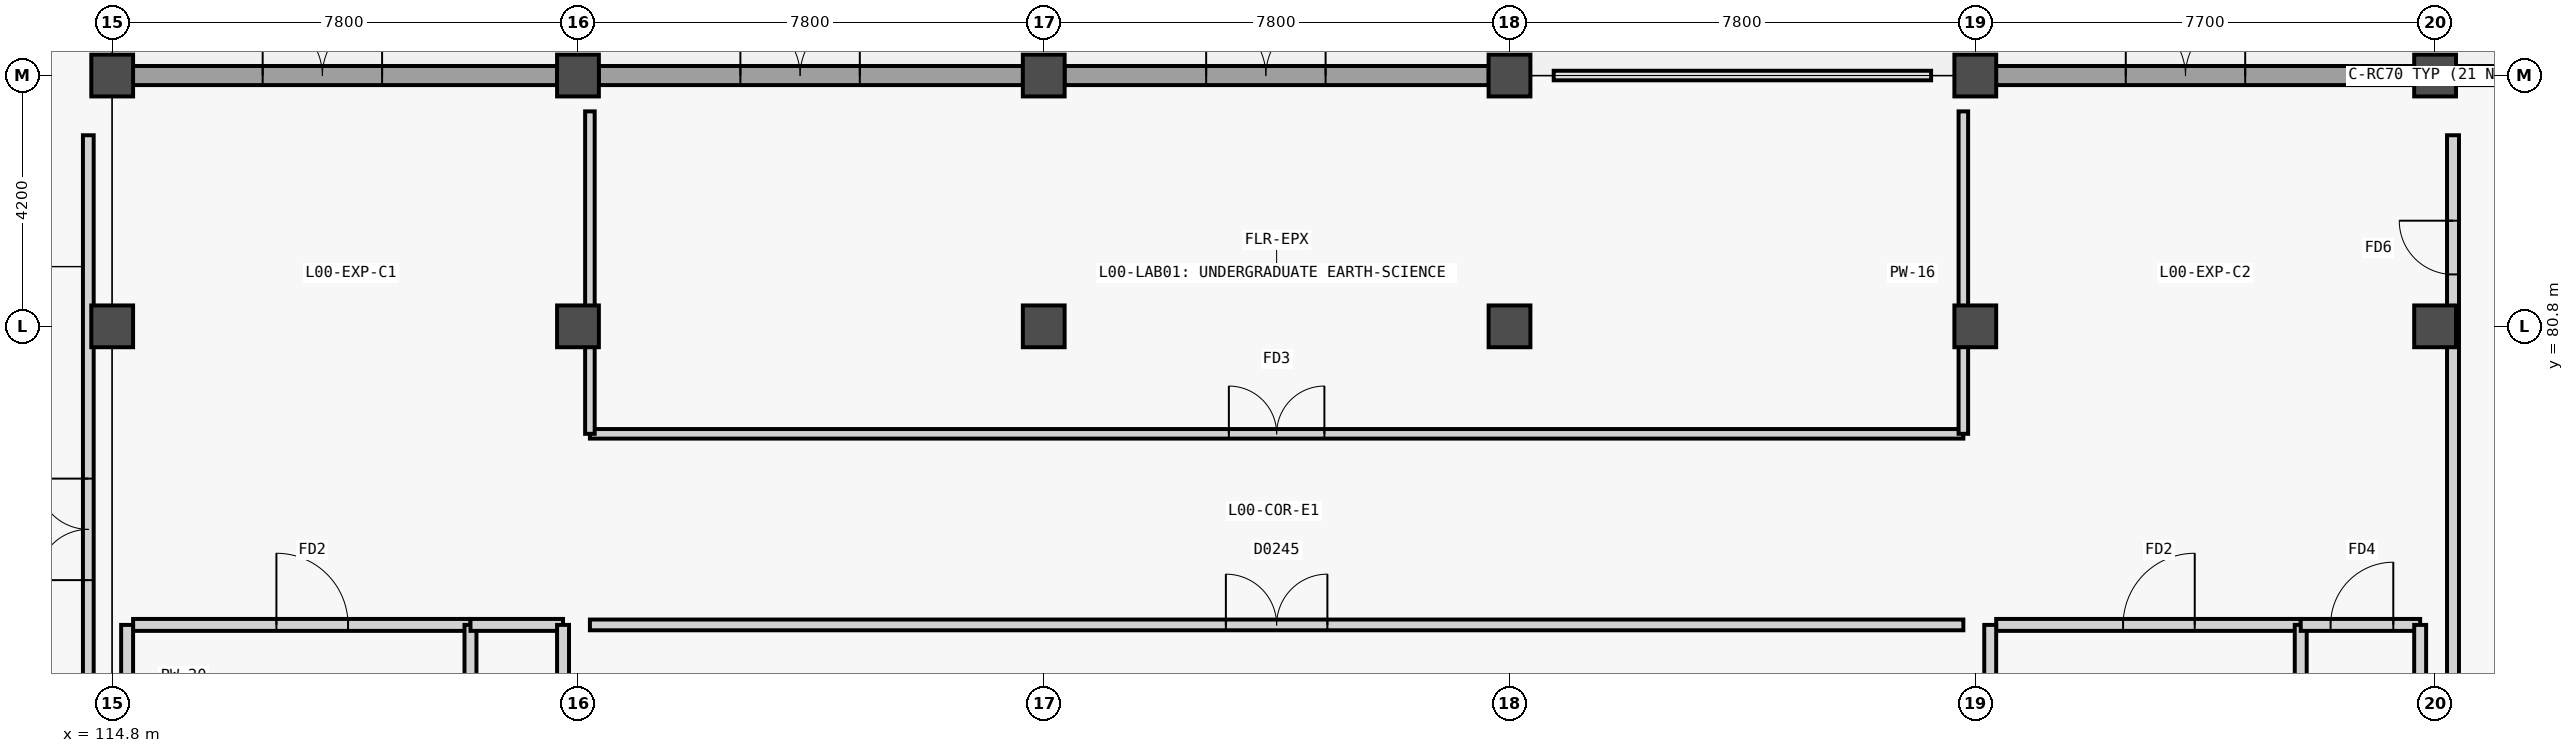
"""IFC4 building model, lengths in metres.
Left out: names, types, materials, properties, quantities, classifications, styles, units other than length and angle.
Written with IfcOpenShell. Run it as: python <this file> out.ifc"""

import sys

from ifc_helpers import new_model, si_unit, direction, frame, frame_2d, origin, origin_2d, place, context, subcontext, project, spatial, rectangle, extrude, element, fill, save


model = new_model("IFC4")
c1 = context("Model", 3, precision=1e-05, world=origin(), true_north=direction((0.0, 1.0)))
c2 = subcontext(c1, "Body", "Model", "MODEL_VIEW")
j1 = project(units=[si_unit("LENGTHUNIT", "METRE"), si_unit("PLANEANGLEUNIT", "RADIAN")], contexts=[c1])
p1 = place(None, origin())
s1 = spatial("IfcSite", under=j1, at=p1, CompositionType="ELEMENT")
p2 = place(p1, origin())
s2 = spatial("IfcBuilding", under=s1, at=p2, CompositionType="ELEMENT")
p3 = place(p2, origin())
s3 = spatial("IfcBuildingStorey", under=s2, at=p3, CompositionType="ELEMENT", Elevation=0.0)
for number, where, z_axis, x_axis in (
    (1, (114.8, 80.8, 0.0), (0.0, 0.0, 1.0), (1.0, 0.0, 0.0)),
    (2, (114.8, 85.0, 0.0), (0.0, 0.0, 1.0), (1.0, 0.0, 0.0)),
    (3, (122.6, 80.8, 0.0), (0.0, 0.0, 1.0), (1.0, 0.0, 0.0)),
    (4, (122.6, 85.0, 0.0), (0.0, 0.0, 1.0), (1.0, 0.0, 0.0)),
    (5, (130.4, 80.8, 0.0), (0.0, 0.0, 1.0), (1.0, 0.0, 0.0)),
    (6, (130.4, 85.0, 0.0), (0.0, 0.0, 1.0), (1.0, 0.0, 0.0)),
    (7, (138.2, 80.8, 0.0), (0.0, 0.0, 1.0), (1.0, 0.0, 0.0)),
    (8, (138.2, 85.0, 0.0), (0.0, 0.0, 1.0), (1.0, 0.0, 0.0)),
    (9, (146.0, 80.8, 0.0), (0.0, 0.0, 1.0), (1.0, 0.0, 0.0)),
    (10, (146.0, 85.0, 0.0), (0.0, 0.0, 1.0), (1.0, 0.0, 0.0)),
    (11, (153.7, 80.8, 0.0), (0.0, 0.0, 1.0), (1.0, 0.0, 0.0)),
    (12, (153.7, 85.0, 0.0), (0.0, 0.0, 1.0), (1.0, 0.0, 0.0)),
):
    element("IfcColumn", number, at=place(p3, frame(where, z_axis=z_axis, x_axis=x_axis)), inside=s3, PredefinedType="COLUMN", context=c2, shape_type="SweptSolid", body=[
        extrude(rectangle(XDim=0.7, YDim=0.7, at=origin_2d()), origin(), (0.0, 0.0, 1.0), 5.4),
    ])
p4 = place(p3, frame((115.148, 85.0, 0.0), z_axis=(0.0, 0.0, 1.0), x_axis=(1.0, 0.0, 0.0)))
e13 = element("IfcWall", 13, at=p4, inside=s3, PredefinedType="SOLIDWALL", context=c2, shape_type="SweptSolid", body=[
    extrude(rectangle(XDim=7.104, YDim=0.32, at=frame_2d((3.552, 0.0))), origin(), (0.0, 0.0, 1.0), 5.05),
])
p5 = place(p4, frame((2.172, 0.0, 0.0)))
e14 = element("IfcOpeningElement", 14, at=p5, cuts=e13, PredefinedType="OPENING", context=c2, shape_type="SweptSolid", body=[
    extrude(rectangle(XDim=2.0, YDim=2.4, at=frame_2d((1.0, 1.2))), frame((0.0, 0.17, 0.0), z_axis=(0.0, -1.0, 0.0), x_axis=(1.0, 0.0, 0.0)), (0.0, 0.0, 1.0), 0.34),
])
p6 = place(p3, frame((122.948, 85.0, 0.0), z_axis=(0.0, 0.0, 1.0), x_axis=(1.0, 0.0, 0.0)))
e15 = element("IfcWall", 15, at=p6, inside=s3, PredefinedType="SOLIDWALL", context=c2, shape_type="SweptSolid", body=[
    extrude(rectangle(XDim=7.104, YDim=0.32, at=frame_2d((3.552, 0.0))), origin(), (0.0, 0.0, 1.0), 5.05),
])
p7 = place(p6, frame((2.372, 0.0, 0.0)))
e16 = element("IfcOpeningElement", 16, at=p7, cuts=e15, PredefinedType="OPENING", context=c2, shape_type="SweptSolid", body=[
    extrude(rectangle(XDim=2.0, YDim=2.4, at=frame_2d((1.0, 1.2))), frame((0.0, 0.17, 0.0), z_axis=(0.0, -1.0, 0.0), x_axis=(1.0, 0.0, 0.0)), (0.0, 0.0, 1.0), 0.34),
])
p8 = place(p3, frame((130.748, 85.0, 0.0), z_axis=(0.0, 0.0, 1.0), x_axis=(1.0, 0.0, 0.0)))
e17 = element("IfcWall", 17, at=p8, inside=s3, PredefinedType="SOLIDWALL", context=c2, shape_type="SweptSolid", body=[
    extrude(rectangle(XDim=7.104, YDim=0.32, at=frame_2d((3.552, 0.0))), origin(), (0.0, 0.0, 1.0), 5.05),
])
p9 = place(p8, frame((2.372, 0.0, 0.0)))
e18 = element("IfcOpeningElement", 18, at=p9, cuts=e17, PredefinedType="OPENING", context=c2, shape_type="SweptSolid", body=[
    extrude(rectangle(XDim=2.0, YDim=2.4, at=frame_2d((1.0, 1.2))), frame((0.0, 0.17, 0.0), z_axis=(0.0, -1.0, 0.0), x_axis=(1.0, 0.0, 0.0)), (0.0, 0.0, 1.0), 0.34),
])
p10 = place(p3, frame((146.348, 85.0, 0.0), z_axis=(0.0, 0.0, 1.0), x_axis=(1.0, 0.0, 0.0)))
e19 = element("IfcWall", 19, at=p10, inside=s3, PredefinedType="SOLIDWALL", context=c2, shape_type="SweptSolid", body=[
    extrude(rectangle(XDim=7.004, YDim=0.32, at=frame_2d((3.502, 0.0))), origin(), (0.0, 0.0, 1.0), 5.05),
])
p11 = place(p10, frame((2.172, 0.0, 0.0)))
e20 = element("IfcOpeningElement", 20, at=p11, cuts=e19, PredefinedType="OPENING", context=c2, shape_type="SweptSolid", body=[
    extrude(rectangle(XDim=2.0, YDim=2.4, at=frame_2d((1.0, 1.2))), frame((0.0, 0.17, 0.0), z_axis=(0.0, -1.0, 0.0), x_axis=(1.0, 0.0, 0.0)), (0.0, 0.0, 1.0), 0.34),
])
p12 = place(p3, frame((154.048, 85.0, 0.0), z_axis=(0.0, 0.0, 1.0), x_axis=(1.0, 0.0, 0.0)))
e21 = element("IfcWall", 21, at=p12, inside=s3, PredefinedType="SOLIDWALL", context=c2, shape_type="SweptSolid", body=[
    extrude(rectangle(XDim=7.004, YDim=0.32, at=frame_2d((3.502, 0.0))), origin(), (0.0, 0.0, 1.0), 5.05),
])
p13 = place(p12, frame((1.572, 0.0, 0.0)))
e22 = element("IfcOpeningElement", 22, at=p13, cuts=e21, PredefinedType="OPENING", context=c2, shape_type="SweptSolid", body=[
    extrude(rectangle(XDim=3.6, YDim=3.6, at=frame_2d((1.8, 1.8))), frame((0.0, 0.17, 0.0), z_axis=(0.0, -1.0, 0.0), x_axis=(1.0, 0.0, 0.0)), (0.0, 0.0, 1.0), 0.34),
])
p14 = place(p3, frame((115.15, 75.8, 0.0), z_axis=(0.0, 0.0, 1.0), x_axis=(1.0, 0.0, 0.0)))
e23 = element("IfcWall", 23, at=p14, inside=s3, PredefinedType="PARTITIONING", context=c2, shape_type="SweptSolid", body=[
    extrude(rectangle(XDim=5.65, YDim=0.2, at=frame_2d((2.825, 0.0))), origin(), (0.0, 0.0, 1.0), 5.12),
])
p15 = place(p14, frame((2.4, 0.0, 0.0)))
e24 = element("IfcOpeningElement", 24, at=p15, cuts=e23, PredefinedType="OPENING", context=c2, shape_type="SweptSolid", body=[
    extrude(rectangle(XDim=1.2, YDim=2.2, at=frame_2d((0.6, 1.1))), frame((0.0, 0.11, 0.0), z_axis=(0.0, -1.0, 0.0), x_axis=(1.0, 0.0, 0.0)), (0.0, 0.0, 1.0), 0.22),
])
p16 = place(p3, frame((115.05, 72.4, 0.0), z_axis=(0.0, 0.0, 1.0), x_axis=(0.0, 1.0, 0.0)))
e25 = element("IfcWall", 25, at=p16, inside=s3, PredefinedType="PARTITIONING", context=c2, shape_type="SweptSolid", body=[
    extrude(rectangle(XDim=3.4, YDim=0.2, at=frame_2d((1.7, 0.0))), origin(), (0.0, 0.0, 1.0), 4.37),
])
p17 = place(p3, frame((120.8, 72.4, 0.0), z_axis=(0.0, 0.0, 1.0), x_axis=(0.0, 1.0, 0.0)))
e26 = element("IfcWall", 26, at=p17, inside=s3, PredefinedType="PARTITIONING", context=c2, shape_type="SweptSolid", body=[
    extrude(rectangle(XDim=3.4, YDim=0.2, at=frame_2d((1.7, 0.0))), origin(), (0.0, 0.0, 1.0), 5.12),
])
p18 = place(p17, frame((1.1, 0.0, 0.0)))
e27 = element("IfcOpeningElement", 27, at=p18, cuts=e26, PredefinedType="OPENING", context=c2, shape_type="SweptSolid", body=[
    extrude(rectangle(XDim=1.2, YDim=2.2, at=frame_2d((0.6, 1.1))), frame((0.0, 0.11, 0.0), z_axis=(0.0, -1.0, 0.0), x_axis=(1.0, 0.0, 0.0)), (0.0, 0.0, 1.0), 0.22),
])
p19 = place(p3, frame((120.8, 75.8, 0.0), z_axis=(0.0, 0.0, 1.0), x_axis=(1.0, 0.0, 0.0)))
e28 = element("IfcWall", 28, at=p19, inside=s3, PredefinedType="PARTITIONING", context=c2, shape_type="SweptSolid", body=[
    extrude(rectangle(XDim=1.55, YDim=0.2, at=frame_2d((0.775, 0.0))), origin(), (0.0, 0.0, 1.0), 5.12),
])
p20 = place(p3, frame((122.35, 72.4, 0.0), z_axis=(0.0, 0.0, 1.0), x_axis=(0.0, 1.0, 0.0)))
e29 = element("IfcWall", 29, at=p20, inside=s3, PredefinedType="PARTITIONING", context=c2, shape_type="SweptSolid", body=[
    extrude(rectangle(XDim=3.4, YDim=0.2, at=frame_2d((1.7, 0.0))), origin(), (0.0, 0.0, 1.0), 4.37),
])
p21 = place(p3, frame((146.35, 75.8, 0.0), z_axis=(0.0, 0.0, 1.0), x_axis=(1.0, 0.0, 0.0)))
e30 = element("IfcWall", 30, at=p21, inside=s3, PredefinedType="PARTITIONING", context=c2, shape_type="SweptSolid", body=[
    extrude(rectangle(XDim=5.1, YDim=0.2, at=frame_2d((2.55, 0.0))), origin(), (0.0, 0.0, 1.0), 5.12),
])
p22 = place(p21, frame((2.125, 0.0, 0.0)))
e31 = element("IfcOpeningElement", 31, at=p22, cuts=e30, PredefinedType="OPENING", context=c2, shape_type="SweptSolid", body=[
    extrude(rectangle(XDim=1.2, YDim=2.2, at=frame_2d((0.6, 1.1))), frame((0.0, 0.11, 0.0), z_axis=(0.0, -1.0, 0.0), x_axis=(1.0, 0.0, 0.0)), (0.0, 0.0, 1.0), 0.22),
])
p23 = place(p3, frame((146.25, 72.4, 0.0), z_axis=(0.0, 0.0, 1.0), x_axis=(0.0, 1.0, 0.0)))
e32 = element("IfcWall", 32, at=p23, inside=s3, PredefinedType="PARTITIONING", context=c2, shape_type="SweptSolid", body=[
    extrude(rectangle(XDim=3.4, YDim=0.2, at=frame_2d((1.7, 0.0))), origin(), (0.0, 0.0, 1.0), 4.37),
])
p24 = place(p3, frame((151.45, 72.4, 0.0), z_axis=(0.0, 0.0, 1.0), x_axis=(0.0, 1.0, 0.0)))
e33 = element("IfcWall", 33, at=p24, inside=s3, PredefinedType="PARTITIONING", context=c2, shape_type="SweptSolid", body=[
    extrude(rectangle(XDim=3.4, YDim=0.2, at=frame_2d((1.7, 0.0))), origin(), (0.0, 0.0, 1.0), 5.12),
])
p25 = place(p24, frame((1.1, 0.0, 0.0)))
e34 = element("IfcOpeningElement", 34, at=p25, cuts=e33, PredefinedType="OPENING", context=c2, shape_type="SweptSolid", body=[
    extrude(rectangle(XDim=1.2, YDim=2.2, at=frame_2d((0.6, 1.1))), frame((0.0, 0.11, 0.0), z_axis=(0.0, -1.0, 0.0), x_axis=(1.0, 0.0, 0.0)), (0.0, 0.0, 1.0), 0.22),
])
p26 = place(p3, frame((151.45, 75.8, 0.0), z_axis=(0.0, 0.0, 1.0), x_axis=(1.0, 0.0, 0.0)))
e35 = element("IfcWall", 35, at=p26, inside=s3, PredefinedType="PARTITIONING", context=c2, shape_type="SweptSolid", body=[
    extrude(rectangle(XDim=2.0, YDim=0.2, at=frame_2d((1.0, 0.0))), origin(), (0.0, 0.0, 1.0), 5.12),
])
p27 = place(p26, frame((0.5, 0.0, 0.0)))
e36 = element("IfcOpeningElement", 36, at=p27, cuts=e35, PredefinedType="OPENING", context=c2, shape_type="SweptSolid", body=[
    extrude(rectangle(XDim=1.05, YDim=2.15, at=frame_2d((0.525, 1.075))), frame((0.0, 0.11, 0.0), z_axis=(0.0, -1.0, 0.0), x_axis=(1.0, 0.0, 0.0)), (0.0, 0.0, 1.0), 0.22),
])
p28 = place(p3, frame((153.45, 72.4, 0.0), z_axis=(0.0, 0.0, 1.0), x_axis=(0.0, 1.0, 0.0)))
e37 = element("IfcWall", 37, at=p28, inside=s3, PredefinedType="PARTITIONING", context=c2, shape_type="SweptSolid", body=[
    extrude(rectangle(XDim=3.4, YDim=0.2, at=frame_2d((1.7, 0.0))), origin(), (0.0, 0.0, 1.0), 4.37),
])
p29 = place(p3, frame((114.4, 64.5, 0.0), z_axis=(0.0, 0.0, 1.0), x_axis=(0.0, 1.0, 0.0)))
e38 = element("IfcWall", 38, at=p29, inside=s3, PredefinedType="PARTITIONING", context=c2, shape_type="SweptSolid", body=[
    extrude(rectangle(XDim=19.5, YDim=0.18, at=frame_2d((9.75, 0.0))), origin(), (0.0, 0.0, 1.0), 4.37),
])
p30 = place(p29, frame((12.05, 0.0, 0.0)))
e39 = element("IfcOpeningElement", 39, at=p30, cuts=e38, PredefinedType="OPENING", context=c2, shape_type="SweptSolid", body=[
    extrude(rectangle(XDim=1.7, YDim=2.25, at=frame_2d((0.85, 1.125))), frame((0.0, 0.1, 0.0), z_axis=(0.0, -1.0, 0.0), x_axis=(1.0, 0.0, 0.0)), (0.0, 0.0, 1.0), 0.2),
])
p31 = place(p3, frame((122.8, 75.8, 0.0), z_axis=(0.0, 0.0, 1.0), x_axis=(1.0, 0.0, 0.0)))
e40 = element("IfcWall", 40, at=p31, inside=s3, PredefinedType="PARTITIONING", context=c2, shape_type="SweptSolid", body=[
    extrude(rectangle(XDim=23.0, YDim=0.18, at=frame_2d((11.5, 0.0))), origin(), (0.0, 0.0, 1.0), 5.14),
])
p32 = place(p31, frame((10.65, 0.0, 0.0)))
e41 = element("IfcOpeningElement", 41, at=p32, cuts=e40, PredefinedType="OPENING", context=c2, shape_type="SweptSolid", body=[
    extrude(rectangle(XDim=1.7, YDim=2.25, at=frame_2d((0.85, 1.125))), frame((0.0, 0.1, 0.0), z_axis=(0.0, -1.0, 0.0), x_axis=(1.0, 0.0, 0.0)), (0.0, 0.0, 1.0), 0.2),
])
p33 = place(p3, frame((122.8, 79.0, 0.0), z_axis=(0.0, 0.0, 1.0), x_axis=(1.0, 0.0, 0.0)))
e42 = element("IfcWall", 42, at=p33, inside=s3, PredefinedType="PARTITIONING", context=c2, shape_type="SweptSolid", body=[
    extrude(rectangle(XDim=23.0, YDim=0.16, at=frame_2d((11.5, 0.0))), origin(), (0.0, 0.0, 1.0), 5.14),
])
p34 = place(p33, frame((10.7, 0.0, 0.0)))
e43 = element("IfcOpeningElement", 43, at=p34, cuts=e42, PredefinedType="OPENING", context=c2, shape_type="SweptSolid", body=[
    extrude(rectangle(XDim=1.6, YDim=2.2, at=frame_2d((0.8, 1.1))), frame((0.0, 0.09, 0.0), z_axis=(0.0, -1.0, 0.0), x_axis=(1.0, 0.0, 0.0)), (0.0, 0.0, 1.0), 0.18),
])
for number, where, z_axis, x_axis in (
    (44, (122.8, 79.0, 0.0), (0.0, 0.0, 1.0), (0.0, 1.0, 0.0)),
    (45, (145.8, 79.0, 0.0), (0.0, 0.0, 1.0), (0.0, 1.0, 0.0)),
):
    element("IfcWall", number, at=place(p3, frame(where, z_axis=z_axis, x_axis=x_axis)), inside=s3, PredefinedType="PARTITIONING", context=c2, shape_type="SweptSolid", body=[
        extrude(rectangle(XDim=5.4, YDim=0.16, at=frame_2d((2.7, 0.0))), origin(), (0.0, 0.0, 1.0), 4.37),
    ])
p35 = place(p3, frame((154.0, 64.5, 0.0), z_axis=(0.0, 0.0, 1.0), x_axis=(0.0, 1.0, 0.0)))
e46 = element("IfcWall", 46, at=p35, inside=s3, PredefinedType="PARTITIONING", context=c2, shape_type="SweptSolid", body=[
    extrude(rectangle(XDim=19.5, YDim=0.2, at=frame_2d((9.75, 0.0))), origin(), (0.0, 0.0, 1.0), 4.37),
])
p36 = place(p35, frame((17.169, 0.0, 0.0)))
e47 = element("IfcOpeningElement", 47, at=p36, cuts=e46, PredefinedType="OPENING", context=c2, shape_type="SweptSolid", body=[
    extrude(rectangle(XDim=0.9, YDim=2.1, at=frame_2d((0.45, 1.05))), frame((0.0, 0.11, 0.0), z_axis=(0.0, -1.0, 0.0), x_axis=(1.0, 0.0, 0.0)), (0.0, 0.0, 1.0), 0.22),
])
p37 = place(p5, origin())
e48 = element("IfcDoor", 48, at=p37, inside=s3, OperationType="DOUBLE_DOOR_SINGLE_SWING", PredefinedType="DOOR", context=c2, shape_type="SweptSolid", body=[
    extrude(rectangle(XDim=2.0, YDim=2.4, at=frame_2d((1.0, 1.2))), frame((0.0, 0.025, 0.0), z_axis=(0.0, -1.0, 0.0), x_axis=(1.0, 0.0, 0.0)), (0.0, 0.0, 1.0), 0.05),
])
fill(e14, e48)
p38 = place(p7, origin())
e49 = element("IfcDoor", 49, at=p38, inside=s3, OperationType="DOUBLE_DOOR_SINGLE_SWING", PredefinedType="DOOR", context=c2, shape_type="SweptSolid", body=[
    extrude(rectangle(XDim=2.0, YDim=2.4, at=frame_2d((1.0, 1.2))), frame((0.0, 0.025, 0.0), z_axis=(0.0, -1.0, 0.0), x_axis=(1.0, 0.0, 0.0)), (0.0, 0.0, 1.0), 0.05),
])
fill(e16, e49)
p39 = place(p9, origin())
e50 = element("IfcDoor", 50, at=p39, inside=s3, OperationType="DOUBLE_DOOR_SINGLE_SWING", PredefinedType="DOOR", context=c2, shape_type="SweptSolid", body=[
    extrude(rectangle(XDim=2.0, YDim=2.4, at=frame_2d((1.0, 1.2))), frame((0.0, 0.025, 0.0), z_axis=(0.0, -1.0, 0.0), x_axis=(1.0, 0.0, 0.0)), (0.0, 0.0, 1.0), 0.05),
])
fill(e18, e50)
p40 = place(p11, origin())
e51 = element("IfcDoor", 51, at=p40, inside=s3, OperationType="DOUBLE_DOOR_SINGLE_SWING", PredefinedType="DOOR", context=c2, shape_type="SweptSolid", body=[
    extrude(rectangle(XDim=2.0, YDim=2.4, at=frame_2d((1.0, 1.2))), frame((0.0, 0.025, 0.0), z_axis=(0.0, -1.0, 0.0), x_axis=(1.0, 0.0, 0.0)), (0.0, 0.0, 1.0), 0.05),
])
fill(e20, e51)
p41 = place(p15, origin())
e52 = element("IfcDoor", 52, at=p41, inside=s3, OperationType="SINGLE_SWING_LEFT", PredefinedType="DOOR", context=c2, shape_type="SweptSolid", body=[
    extrude(rectangle(XDim=1.2, YDim=2.2, at=frame_2d((0.6, 1.1))), frame((0.0, 0.025, 0.0), z_axis=(0.0, -1.0, 0.0), x_axis=(1.0, 0.0, 0.0)), (0.0, 0.0, 1.0), 0.05),
])
fill(e24, e52)
p42 = place(p22, origin())
e53 = element("IfcDoor", 53, at=p42, inside=s3, OperationType="SINGLE_SWING_RIGHT", PredefinedType="DOOR", context=c2, shape_type="SweptSolid", body=[
    extrude(rectangle(XDim=1.2, YDim=2.2, at=frame_2d((0.6, 1.1))), frame((0.0, 0.025, 0.0), z_axis=(0.0, -1.0, 0.0), x_axis=(1.0, 0.0, 0.0)), (0.0, 0.0, 1.0), 0.05),
])
fill(e31, e53)
p43 = place(p27, origin())
e54 = element("IfcDoor", 54, at=p43, inside=s3, OperationType="SINGLE_SWING_RIGHT", PredefinedType="DOOR", context=c2, shape_type="SweptSolid", body=[
    extrude(rectangle(XDim=1.05, YDim=2.15, at=frame_2d((0.525, 1.075))), frame((0.0, 0.025, 0.0), z_axis=(0.0, -1.0, 0.0), x_axis=(1.0, 0.0, 0.0)), (0.0, 0.0, 1.0), 0.05),
])
fill(e36, e54)
p44 = place(p30, origin())
e55 = element("IfcDoor", 55, at=p44, inside=s3, OperationType="DOUBLE_DOOR_SINGLE_SWING", PredefinedType="DOOR", context=c2, shape_type="SweptSolid", body=[
    extrude(rectangle(XDim=1.7, YDim=2.25, at=frame_2d((0.85, 1.125))), frame((0.0, 0.025, 0.0), z_axis=(0.0, -1.0, 0.0), x_axis=(1.0, 0.0, 0.0)), (0.0, 0.0, 1.0), 0.05),
])
fill(e39, e55)
p45 = place(p32, origin())
e56 = element("IfcDoor", 56, at=p45, inside=s3, OperationType="DOUBLE_DOOR_SINGLE_SWING", PredefinedType="DOOR", context=c2, shape_type="SweptSolid", body=[
    extrude(rectangle(XDim=1.7, YDim=2.25, at=frame_2d((0.85, 1.125))), frame((0.0, 0.025, 0.0), z_axis=(0.0, -1.0, 0.0), x_axis=(1.0, 0.0, 0.0)), (0.0, 0.0, 1.0), 0.05),
])
fill(e41, e56)
p46 = place(p34, origin())
e57 = element("IfcDoor", 57, at=p46, inside=s3, OperationType="DOUBLE_DOOR_SINGLE_SWING", PredefinedType="DOOR", context=c2, shape_type="SweptSolid", body=[
    extrude(rectangle(XDim=1.6, YDim=2.2, at=frame_2d((0.8, 1.1))), frame((0.0, 0.025, 0.0), z_axis=(0.0, -1.0, 0.0), x_axis=(1.0, 0.0, 0.0)), (0.0, 0.0, 1.0), 0.05),
])
fill(e43, e57)
p47 = place(p36, origin())
e58 = element("IfcDoor", 58, at=p47, inside=s3, OperationType="SINGLE_SWING_RIGHT", PredefinedType="DOOR", context=c2, shape_type="SweptSolid", body=[
    extrude(rectangle(XDim=0.9, YDim=2.1, at=frame_2d((0.45, 1.05))), frame((0.0, 0.025, 0.0), z_axis=(0.0, -1.0, 0.0), x_axis=(1.0, 0.0, 0.0)), (0.0, 0.0, 1.0), 0.05),
])
fill(e47, e58)
save(model, sys.argv[1])
